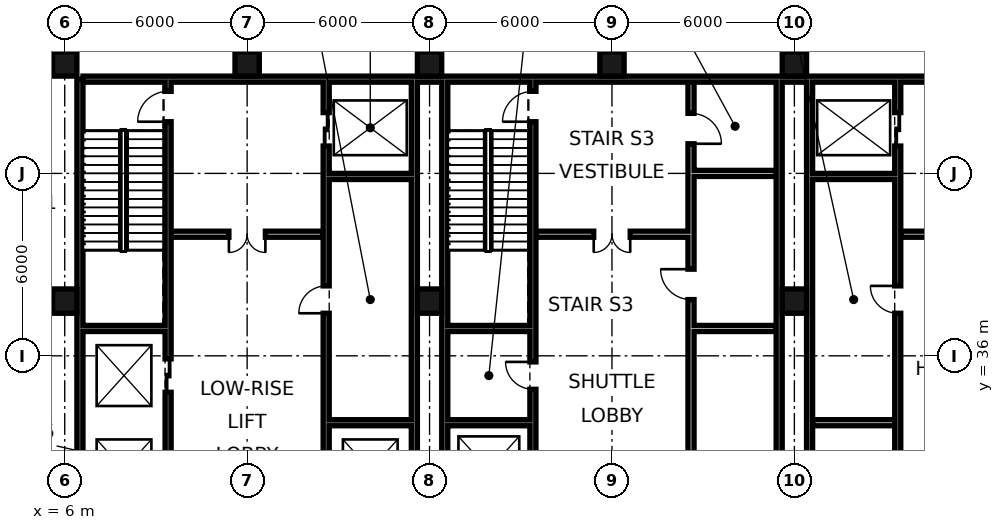
"""IFC4 building model, lengths in metres.
Left out: names, types, materials, properties, quantities, classifications, styles, units other than length and angle.
Written with IfcOpenShell. Run it as: python <this file> out.ifc"""

import sys

from ifc_helpers import new_model, si_unit, direction, frame, frame_2d, origin, origin_2d, place, context, subcontext, project, spatial, rectangle, hollow_rectangle, extrude, element, fill, save


model = new_model("IFC4")
c1 = context("Model", 3, precision=1e-05, world=origin(), true_north=direction((0.0, 1.0)))
c2 = subcontext(c1, "Body", "Model", "MODEL_VIEW")
j1 = project(units=[si_unit("LENGTHUNIT", "METRE"), si_unit("PLANEANGLEUNIT", "RADIAN")], contexts=[c1])
p1 = place(None, origin())
s1 = spatial("IfcSite", under=j1, at=p1, CompositionType="ELEMENT")
p2 = place(p1, origin())
s2 = spatial("IfcBuilding", under=s1, at=p2, CompositionType="ELEMENT")
p3 = place(p2, origin())
s3 = spatial("IfcBuildingStorey", under=s2, at=p3, CompositionType="ELEMENT", Elevation=0.0)
for number, where, z_axis, x_axis in (
    (1, (6.0, 37.8, 0.0), (0.0, 0.0, 1.0), (1.0, 0.0, 0.0)),
    (2, (6.0, 45.6, 0.0), (0.0, 0.0, 1.0), (1.0, 0.0, 0.0)),
    (3, (12.0, 45.6, 0.0), (0.0, 0.0, 1.0), (1.0, 0.0, 0.0)),
    (4, (18.0, 37.8, 0.0), (0.0, 0.0, 1.0), (1.0, 0.0, 0.0)),
    (5, (18.0, 45.6, 0.0), (0.0, 0.0, 1.0), (1.0, 0.0, 0.0)),
    (6, (24.0, 45.6, 0.0), (0.0, 0.0, 1.0), (1.0, 0.0, 0.0)),
    (7, (30.0, 37.8, 0.0), (0.0, 0.0, 1.0), (1.0, 0.0, 0.0)),
    (8, (30.0, 45.6, 0.0), (0.0, 0.0, 1.0), (1.0, 0.0, 0.0)),
):
    element("IfcColumn", number, at=place(p3, frame(where, z_axis=z_axis, x_axis=x_axis)), inside=s3, PredefinedType="COLUMN", context=c2, shape_type="SweptSolid", body=[
        extrude(hollow_rectangle(XDim=0.8, YDim=0.8, WallThickness=0.07, at=origin_2d()), origin(), (0.0, 0.0, 1.0), 15.0),
    ])
p4 = place(p3, frame((6.5, 21.6, 0.0), z_axis=(0.0, 0.0, 1.0), x_axis=(0.0, 1.0, 0.0)))
e9 = element("IfcWall", 9, at=p4, inside=s3, PredefinedType="SOLIDWALL", context=c2, shape_type="SweptSolid", body=[
    extrude(rectangle(XDim=23.5, YDim=0.2, at=frame_2d((11.75, 0.0))), origin(), (0.0, 0.0, 1.0), 14.55),
])
p5 = place(p3, frame((6.6, 45.1, 0.0), z_axis=(0.0, 0.0, 1.0), x_axis=(1.0, 0.0, 0.0)))
e10 = element("IfcWall", 10, at=p5, inside=s3, PredefinedType="SOLIDWALL", context=c2, shape_type="SweptSolid", body=[
    extrude(rectangle(XDim=34.8, YDim=0.2, at=frame_2d((17.4, 0.0))), origin(), (0.0, 0.0, 1.0), 14.55),
])
for number, where, z_axis, x_axis in (
    (11, (17.5, 27.6, 0.0), (0.0, 0.0, 1.0), (0.0, 1.0, 0.0)),
    (12, (18.5, 27.6, 0.0), (0.0, 0.0, 1.0), (0.0, 1.0, 0.0)),
    (13, (29.5, 27.6, 0.0), (0.0, 0.0, 1.0), (0.0, 1.0, 0.0)),
    (14, (30.5, 27.6, 0.0), (0.0, 0.0, 1.0), (0.0, 1.0, 0.0)),
):
    element("IfcWall", number, at=place(p3, frame(where, z_axis=z_axis, x_axis=x_axis)), inside=s3, PredefinedType="SOLIDWALL", context=c2, shape_type="SweptSolid", body=[
        extrude(rectangle(XDim=17.5, YDim=0.2, at=frame_2d((8.75, 0.0))), origin(), (0.0, 0.0, 1.0), 14.55),
    ])
p6 = place(p3, frame((14.6, 27.7, 0.0), z_axis=(0.0, 0.0, 1.0), x_axis=(0.0, 1.0, 0.0)))
e15 = element("IfcWall", 15, at=p6, inside=s3, PredefinedType="SOLIDWALL", context=c2, shape_type="SweptSolid", body=[
    extrude(rectangle(XDim=17.3, YDim=0.2, at=frame_2d((8.65, 0.0))), origin(), (0.0, 0.0, 1.0), 14.55),
])
p7 = place(p6, frame((0.9, 0.0, 0.0)))
e16 = element("IfcOpeningElement", 16, at=p7, cuts=e15, PredefinedType="OPENING", context=c2, shape_type="SweptSolid", body=[
    extrude(rectangle(XDim=1.1, YDim=2.1, at=frame_2d((0.55, 1.05))), frame((0.0, 0.11, 0.0), z_axis=(0.0, -1.0, 0.0), x_axis=(1.0, 0.0, 0.0)), (0.0, 0.0, 1.0), 0.22),
])
p8 = place(p6, frame((4.0, 0.0, 0.0)))
e17 = element("IfcOpeningElement", 17, at=p8, cuts=e15, PredefinedType="OPENING", context=c2, shape_type="SweptSolid", body=[
    extrude(rectangle(XDim=1.1, YDim=2.1, at=frame_2d((0.55, 1.05))), frame((0.0, 0.11, 0.0), z_axis=(0.0, -1.0, 0.0), x_axis=(1.0, 0.0, 0.0)), (0.0, 0.0, 1.0), 0.22),
])
p9 = place(p6, frame((15.2, 0.0, 0.0)))
e18 = element("IfcOpeningElement", 18, at=p9, cuts=e15, PredefinedType="OPENING", context=c2, shape_type="SweptSolid", body=[
    extrude(rectangle(XDim=1.1, YDim=2.1, at=frame_2d((0.55, 1.05))), frame((0.0, 0.11, 0.0), z_axis=(0.0, -1.0, 0.0), x_axis=(1.0, 0.0, 0.0)), (0.0, 0.0, 1.0), 0.22),
])
p10 = place(p6, frame((9.7, 0.0, 0.0)))
e19 = element("IfcOpeningElement", 19, at=p10, cuts=e15, PredefinedType="OPENING", context=c2, shape_type="SweptSolid", body=[
    extrude(rectangle(XDim=0.9, YDim=2.1, at=frame_2d((0.45, 1.05))), frame((0.0, 0.11, 0.0), z_axis=(0.0, -1.0, 0.0), x_axis=(1.0, 0.0, 0.0)), (0.0, 0.0, 1.0), 0.22),
])
p11 = place(p3, frame((21.4, 27.7, 0.0), z_axis=(0.0, 0.0, 1.0), x_axis=(0.0, 1.0, 0.0)))
e20 = element("IfcWall", 20, at=p11, inside=s3, PredefinedType="SOLIDWALL", context=c2, shape_type="SweptSolid", body=[
    extrude(rectangle(XDim=17.3, YDim=0.2, at=frame_2d((8.65, 0.0))), origin(), (0.0, 0.0, 1.0), 14.55),
])
p12 = place(p11, frame((0.9, 0.0, 0.0)))
e21 = element("IfcOpeningElement", 21, at=p12, cuts=e20, PredefinedType="OPENING", context=c2, shape_type="SweptSolid", body=[
    extrude(rectangle(XDim=1.1, YDim=2.1, at=frame_2d((0.55, 1.05))), frame((0.0, 0.11, 0.0), z_axis=(0.0, -1.0, 0.0), x_axis=(1.0, 0.0, 0.0)), (0.0, 0.0, 1.0), 0.22),
])
p13 = place(p11, frame((4.0, 0.0, 0.0)))
e22 = element("IfcOpeningElement", 22, at=p13, cuts=e20, PredefinedType="OPENING", context=c2, shape_type="SweptSolid", body=[
    extrude(rectangle(XDim=1.1, YDim=2.1, at=frame_2d((0.55, 1.05))), frame((0.0, 0.11, 0.0), z_axis=(0.0, -1.0, 0.0), x_axis=(1.0, 0.0, 0.0)), (0.0, 0.0, 1.0), 0.22),
])
p14 = place(p11, frame((16.0, 0.0, 0.0)))
e23 = element("IfcOpeningElement", 23, at=p14, cuts=e20, PredefinedType="OPENING", context=c2, shape_type="SweptSolid", body=[
    extrude(rectangle(XDim=1.0, YDim=2.1, at=frame_2d((0.5, 1.05))), frame((0.0, 0.11, 0.0), z_axis=(0.0, -1.0, 0.0), x_axis=(1.0, 0.0, 0.0)), (0.0, 0.0, 1.0), 0.22),
])
p15 = place(p11, frame((7.2, 0.0, 0.0)))
e24 = element("IfcOpeningElement", 24, at=p15, cuts=e20, PredefinedType="OPENING", context=c2, shape_type="SweptSolid", body=[
    extrude(rectangle(XDim=0.9, YDim=2.1, at=frame_2d((0.45, 1.05))), frame((0.0, 0.11, 0.0), z_axis=(0.0, -1.0, 0.0), x_axis=(1.0, 0.0, 0.0)), (0.0, 0.0, 1.0), 0.22),
])
p16 = place(p3, frame((26.6, 27.7, 0.0), z_axis=(0.0, 0.0, 1.0), x_axis=(0.0, 1.0, 0.0)))
e25 = element("IfcWall", 25, at=p16, inside=s3, PredefinedType="SOLIDWALL", context=c2, shape_type="SweptSolid", body=[
    extrude(rectangle(XDim=17.3, YDim=0.2, at=frame_2d((8.65, 0.0))), origin(), (0.0, 0.0, 1.0), 14.55),
])
p17 = place(p16, frame((4.1, 0.0, 0.0)))
e26 = element("IfcOpeningElement", 26, at=p17, cuts=e25, PredefinedType="OPENING", context=c2, shape_type="SweptSolid", body=[
    extrude(rectangle(XDim=0.9, YDim=2.1, at=frame_2d((0.45, 1.05))), frame((0.0, 0.11, 0.0), z_axis=(0.0, -1.0, 0.0), x_axis=(1.0, 0.0, 0.0)), (0.0, 0.0, 1.0), 0.22),
])
p18 = place(p16, frame((10.15, 0.0, 0.0)))
e27 = element("IfcOpeningElement", 27, at=p18, cuts=e25, PredefinedType="OPENING", context=c2, shape_type="SweptSolid", body=[
    extrude(rectangle(XDim=1.0, YDim=2.1, at=frame_2d((0.5, 1.05))), frame((0.0, 0.11, 0.0), z_axis=(0.0, -1.0, 0.0), x_axis=(1.0, 0.0, 0.0)), (0.0, 0.0, 1.0), 0.22),
])
p19 = place(p16, frame((15.275, 0.0, 0.0)))
e28 = element("IfcOpeningElement", 28, at=p19, cuts=e25, PredefinedType="OPENING", context=c2, shape_type="SweptSolid", body=[
    extrude(rectangle(XDim=1.0, YDim=2.1, at=frame_2d((0.5, 1.05))), frame((0.0, 0.11, 0.0), z_axis=(0.0, -1.0, 0.0), x_axis=(1.0, 0.0, 0.0)), (0.0, 0.0, 1.0), 0.22),
])
p20 = place(p3, frame((33.4, 27.7, 0.0), z_axis=(0.0, 0.0, 1.0), x_axis=(0.0, 1.0, 0.0)))
e29 = element("IfcWall", 29, at=p20, inside=s3, PredefinedType="SOLIDWALL", context=c2, shape_type="SweptSolid", body=[
    extrude(rectangle(XDim=17.3, YDim=0.2, at=frame_2d((8.65, 0.0))), origin(), (0.0, 0.0, 1.0), 13.85),
])
p21 = place(p20, frame((15.2, 0.0, 0.0)))
e30 = element("IfcOpeningElement", 30, at=p21, cuts=e29, PredefinedType="OPENING", context=c2, shape_type="SweptSolid", body=[
    extrude(rectangle(XDim=1.1, YDim=2.1, at=frame_2d((0.55, 1.05))), frame((0.0, 0.11, 0.0), z_axis=(0.0, -1.0, 0.0), x_axis=(1.0, 0.0, 0.0)), (0.0, 0.0, 1.0), 0.22),
])
p22 = place(p20, frame((2.5, 0.0, 0.0)))
e31 = element("IfcOpeningElement", 31, at=p22, cuts=e29, PredefinedType="OPENING", context=c2, shape_type="SweptSolid", body=[
    extrude(rectangle(XDim=1.0, YDim=2.1, at=frame_2d((0.5, 1.05))), frame((0.0, 0.11, 0.0), z_axis=(0.0, -1.0, 0.0), x_axis=(1.0, 0.0, 0.0)), (0.0, 0.0, 1.0), 0.22),
])
p23 = place(p20, frame((9.7, 0.0, 0.0)))
e32 = element("IfcOpeningElement", 32, at=p23, cuts=e29, PredefinedType="OPENING", context=c2, shape_type="SweptSolid", body=[
    extrude(rectangle(XDim=0.9, YDim=2.1, at=frame_2d((0.45, 1.05))), frame((0.0, 0.11, 0.0), z_axis=(0.0, -1.0, 0.0), x_axis=(1.0, 0.0, 0.0)), (0.0, 0.0, 1.0), 0.22),
])
p24 = place(p3, frame((9.4, 21.5, 0.0), z_axis=(0.0, 0.0, 1.0), x_axis=(0.0, 1.0, 0.0)))
e33 = element("IfcWall", 33, at=p24, inside=s3, PredefinedType="SOLIDWALL", context=c2, shape_type="SweptSolid", body=[
    extrude(rectangle(XDim=23.5, YDim=0.2, at=frame_2d((11.75, 0.0))), origin(), (0.0, 0.0, 1.0), 13.85),
])
p25 = place(p24, frame((7.1, 0.0, 0.0)))
e34 = element("IfcOpeningElement", 34, at=p25, cuts=e33, PredefinedType="OPENING", context=c2, shape_type="SweptSolid", body=[
    extrude(rectangle(XDim=1.1, YDim=2.1, at=frame_2d((0.55, 1.05))), frame((0.0, 0.11, 0.0), z_axis=(0.0, -1.0, 0.0), x_axis=(1.0, 0.0, 0.0)), (0.0, 0.0, 1.0), 0.22),
])
p26 = place(p24, frame((10.2, 0.0, 0.0)))
e35 = element("IfcOpeningElement", 35, at=p26, cuts=e33, PredefinedType="OPENING", context=c2, shape_type="SweptSolid", body=[
    extrude(rectangle(XDim=1.1, YDim=2.1, at=frame_2d((0.55, 1.05))), frame((0.0, 0.11, 0.0), z_axis=(0.0, -1.0, 0.0), x_axis=(1.0, 0.0, 0.0)), (0.0, 0.0, 1.0), 0.22),
])
p27 = place(p24, frame((13.3, 0.0, 0.0)))
e36 = element("IfcOpeningElement", 36, at=p27, cuts=e33, PredefinedType="OPENING", context=c2, shape_type="SweptSolid", body=[
    extrude(rectangle(XDim=1.1, YDim=2.1, at=frame_2d((0.55, 1.05))), frame((0.0, 0.11, 0.0), z_axis=(0.0, -1.0, 0.0), x_axis=(1.0, 0.0, 0.0)), (0.0, 0.0, 1.0), 0.22),
])
p28 = place(p24, frame((22.2, 0.0, 0.0)))
e37 = element("IfcOpeningElement", 37, at=p28, cuts=e33, PredefinedType="OPENING", context=c2, shape_type="SweptSolid", body=[
    extrude(rectangle(XDim=1.0, YDim=2.1, at=frame_2d((0.5, 1.05))), frame((0.0, 0.11, 0.0), z_axis=(0.0, -1.0, 0.0), x_axis=(1.0, 0.0, 0.0)), (0.0, 0.0, 1.0), 0.22),
])
p29 = place(p24, frame((0.275, 0.0, 0.0)))
e38 = element("IfcOpeningElement", 38, at=p29, cuts=e33, PredefinedType="OPENING", context=c2, shape_type="SweptSolid", body=[
    extrude(rectangle(XDim=0.9, YDim=2.1, at=frame_2d((0.45, 1.05))), frame((0.0, 0.11, 0.0), z_axis=(0.0, -1.0, 0.0), x_axis=(1.0, 0.0, 0.0)), (0.0, 0.0, 1.0), 0.22),
])
for number, where, z_axis, x_axis in (
    (39, (14.7, 33.8, 0.0), (0.0, 0.0, 1.0), (1.0, 0.0, 0.0)),
    (40, (18.6, 33.8, 0.0), (0.0, 0.0, 1.0), (1.0, 0.0, 0.0)),
    (41, (30.6, 33.8, 0.0), (0.0, 0.0, 1.0), (1.0, 0.0, 0.0)),
    (42, (18.6, 36.9, 0.0), (0.0, 0.0, 1.0), (1.0, 0.0, 0.0)),
    (43, (26.7, 36.9, 0.0), (0.0, 0.0, 1.0), (1.0, 0.0, 0.0)),
    (44, (6.6, 36.9, 0.0), (0.0, 0.0, 1.0), (1.0, 0.0, 0.0)),
):
    element("IfcWall", number, at=place(p3, frame(where, z_axis=z_axis, x_axis=x_axis)), inside=s3, PredefinedType="SOLIDWALL", context=c2, shape_type="SweptSolid", body=[
        extrude(rectangle(XDim=2.7, YDim=0.2, at=frame_2d((1.35, 0.0))), origin(), (0.0, 0.0, 1.0), 14.55),
    ])
p30 = place(p3, frame((21.5, 40.0, 0.0), z_axis=(0.0, 0.0, 1.0), x_axis=(1.0, 0.0, 0.0)))
e45 = element("IfcWall", 45, at=p30, inside=s3, PredefinedType="PARTITIONING", context=c2, shape_type="SweptSolid", body=[
    extrude(rectangle(XDim=5.0, YDim=0.2, at=frame_2d((2.5, 0.0))), origin(), (0.0, 0.0, 1.0), 14.55),
])
p31 = place(p30, frame((1.9, 0.0, 0.0)))
e46 = element("IfcOpeningElement", 46, at=p31, cuts=e45, PredefinedType="OPENING", context=c2, shape_type="SweptSolid", body=[
    extrude(rectangle(XDim=1.2, YDim=2.1, at=frame_2d((0.6, 1.05))), frame((0.0, 0.11, 0.0), z_axis=(0.0, -1.0, 0.0), x_axis=(1.0, 0.0, 0.0)), (0.0, 0.0, 1.0), 0.22),
])
p32 = place(p3, frame((33.5, 40.0, 0.0), z_axis=(0.0, 0.0, 1.0), x_axis=(1.0, 0.0, 0.0)))
e47 = element("IfcWall", 47, at=p32, inside=s3, PredefinedType="PARTITIONING", context=c2, shape_type="SweptSolid", body=[
    extrude(rectangle(XDim=5.0, YDim=0.2, at=frame_2d((2.5, 0.0))), origin(), (0.0, 0.0, 1.0), 14.55),
])
p33 = place(p32, frame((1.9, 0.0, 0.0)))
e48 = element("IfcOpeningElement", 48, at=p33, cuts=e47, PredefinedType="OPENING", context=c2, shape_type="SweptSolid", body=[
    extrude(rectangle(XDim=1.2, YDim=2.1, at=frame_2d((0.6, 1.05))), frame((0.0, 0.11, 0.0), z_axis=(0.0, -1.0, 0.0), x_axis=(1.0, 0.0, 0.0)), (0.0, 0.0, 1.0), 0.22),
])
p34 = place(p3, frame((9.5, 40.0, 0.0), z_axis=(0.0, 0.0, 1.0), x_axis=(1.0, 0.0, 0.0)))
e49 = element("IfcWall", 49, at=p34, inside=s3, PredefinedType="PARTITIONING", context=c2, shape_type="SweptSolid", body=[
    extrude(rectangle(XDim=5.0, YDim=0.2, at=frame_2d((2.5, 0.0))), origin(), (0.0, 0.0, 1.0), 14.55),
])
p35 = place(p34, frame((1.9, 0.0, 0.0)))
e50 = element("IfcOpeningElement", 50, at=p35, cuts=e49, PredefinedType="OPENING", context=c2, shape_type="SweptSolid", body=[
    extrude(rectangle(XDim=1.2, YDim=2.1, at=frame_2d((0.6, 1.05))), frame((0.0, 0.11, 0.0), z_axis=(0.0, -1.0, 0.0), x_axis=(1.0, 0.0, 0.0)), (0.0, 0.0, 1.0), 0.22),
])
for number, where, z_axis, x_axis in (
    (51, (14.7, 41.9, 0.0), (0.0, 0.0, 1.0), (1.0, 0.0, 0.0)),
    (52, (30.6, 41.9, 0.0), (0.0, 0.0, 1.0), (1.0, 0.0, 0.0)),
):
    element("IfcWall", number, at=place(p3, frame(where, z_axis=z_axis, x_axis=x_axis)), inside=s3, PredefinedType="SOLIDWALL", context=c2, shape_type="SweptSolid", body=[
        extrude(rectangle(XDim=2.7, YDim=0.2, at=frame_2d((1.35, 0.0))), origin(), (0.0, 0.0, 1.0), 14.55),
    ])
p36 = place(p3, frame((26.7, 42.0, 0.0), z_axis=(0.0, 0.0, 1.0), x_axis=(1.0, 0.0, 0.0)))
e53 = element("IfcWall", 53, at=p36, inside=s3, PredefinedType="PARTITIONING", context=c2, shape_type="SweptSolid", body=[
    extrude(rectangle(XDim=2.7, YDim=0.2, at=frame_2d((1.35, 0.0))), origin(), (0.0, 0.0, 1.0), 14.55),
])
p37 = place(p35, frame((1.2, 0.0, 0.0), z_axis=(0.0, 0.0, 1.0), x_axis=(-1.0, 0.0, 0.0)))
e54 = element("IfcDoor", 54, at=p37, inside=s3, OperationType="DOUBLE_DOOR_SINGLE_SWING", PredefinedType="DOOR", context=c2, shape_type="SweptSolid", body=[
    extrude(rectangle(XDim=1.2, YDim=2.1, at=frame_2d((0.6, 1.05))), frame((0.0, 0.025, 0.0), z_axis=(0.0, -1.0, 0.0), x_axis=(1.0, 0.0, 0.0)), (0.0, 0.0, 1.0), 0.05),
])
fill(e50, e54)
p38 = place(p31, frame((1.2, 0.0, 0.0), z_axis=(0.0, 0.0, 1.0), x_axis=(-1.0, 0.0, 0.0)))
e55 = element("IfcDoor", 55, at=p38, inside=s3, OperationType="DOUBLE_DOOR_SINGLE_SWING", PredefinedType="DOOR", context=c2, shape_type="SweptSolid", body=[
    extrude(rectangle(XDim=1.2, YDim=2.1, at=frame_2d((0.6, 1.05))), frame((0.0, 0.025, 0.0), z_axis=(0.0, -1.0, 0.0), x_axis=(1.0, 0.0, 0.0)), (0.0, 0.0, 1.0), 0.05),
])
fill(e46, e55)
p39 = place(p21, origin())
e56 = element("IfcDoor", 56, at=p39, inside=s3, OperationType="DOUBLE_DOOR_SLIDING", PredefinedType="DOOR", context=c2, shape_type="SweptSolid", body=[
    extrude(rectangle(XDim=1.1, YDim=2.1, at=frame_2d((0.55, 1.05))), frame((0.0, 0.025, 0.0), z_axis=(0.0, -1.0, 0.0), x_axis=(1.0, 0.0, 0.0)), (0.0, 0.0, 1.0), 0.05),
])
fill(e30, e56)
p40 = place(p9, origin())
e57 = element("IfcDoor", 57, at=p40, inside=s3, OperationType="DOUBLE_DOOR_SLIDING", PredefinedType="DOOR", context=c2, shape_type="SweptSolid", body=[
    extrude(rectangle(XDim=1.1, YDim=2.1, at=frame_2d((0.55, 1.05))), frame((0.0, 0.025, 0.0), z_axis=(0.0, -1.0, 0.0), x_axis=(1.0, 0.0, 0.0)), (0.0, 0.0, 1.0), 0.05),
])
fill(e18, e57)
p41 = place(p27, origin())
e58 = element("IfcDoor", 58, at=p41, inside=s3, OperationType="DOUBLE_DOOR_SLIDING", PredefinedType="DOOR", context=c2, shape_type="SweptSolid", body=[
    extrude(rectangle(XDim=1.1, YDim=2.1, at=frame_2d((0.55, 1.05))), frame((0.0, 0.025, 0.0), z_axis=(0.0, -1.0, 0.0), x_axis=(1.0, 0.0, 0.0)), (0.0, 0.0, 1.0), 0.05),
])
fill(e36, e58)
p42 = place(p28, origin())
e59 = element("IfcDoor", 59, at=p42, inside=s3, OperationType="SINGLE_SWING_LEFT", PredefinedType="DOOR", context=c2, shape_type="SweptSolid", body=[
    extrude(rectangle(XDim=1.0, YDim=2.1, at=frame_2d((0.5, 1.05))), frame((0.0, 0.025, 0.0), z_axis=(0.0, -1.0, 0.0), x_axis=(1.0, 0.0, 0.0)), (0.0, 0.0, 1.0), 0.05),
])
fill(e37, e59)
p43 = place(p14, origin())
e60 = element("IfcDoor", 60, at=p43, inside=s3, OperationType="SINGLE_SWING_LEFT", PredefinedType="DOOR", context=c2, shape_type="SweptSolid", body=[
    extrude(rectangle(XDim=1.0, YDim=2.1, at=frame_2d((0.5, 1.05))), frame((0.0, 0.025, 0.0), z_axis=(0.0, -1.0, 0.0), x_axis=(1.0, 0.0, 0.0)), (0.0, 0.0, 1.0), 0.05),
])
fill(e23, e60)
p44 = place(p10, origin())
e61 = element("IfcDoor", 61, at=p44, inside=s3, OperationType="SINGLE_SWING_LEFT", PredefinedType="DOOR", context=c2, shape_type="SweptSolid", body=[
    extrude(rectangle(XDim=0.9, YDim=2.1, at=frame_2d((0.45, 1.05))), frame((0.0, 0.025, 0.0), z_axis=(0.0, -1.0, 0.0), x_axis=(1.0, 0.0, 0.0)), (0.0, 0.0, 1.0), 0.05),
])
fill(e19, e61)
p45 = place(p23, frame((0.9, 0.0, 0.0), z_axis=(0.0, 0.0, 1.0), x_axis=(-1.0, 0.0, 0.0)))
e62 = element("IfcDoor", 62, at=p45, inside=s3, OperationType="SINGLE_SWING_LEFT", PredefinedType="DOOR", context=c2, shape_type="SweptSolid", body=[
    extrude(rectangle(XDim=0.9, YDim=2.1, at=frame_2d((0.45, 1.05))), frame((0.0, 0.025, 0.0), z_axis=(0.0, -1.0, 0.0), x_axis=(1.0, 0.0, 0.0)), (0.0, 0.0, 1.0), 0.05),
])
fill(e32, e62)
p46 = place(p15, frame((0.9, 0.0, 0.0), z_axis=(0.0, 0.0, 1.0), x_axis=(-1.0, 0.0, 0.0)))
e63 = element("IfcDoor", 63, at=p46, inside=s3, OperationType="SINGLE_SWING_LEFT", PredefinedType="DOOR", context=c2, shape_type="SweptSolid", body=[
    extrude(rectangle(XDim=0.9, YDim=2.1, at=frame_2d((0.45, 1.05))), frame((0.0, 0.025, 0.0), z_axis=(0.0, -1.0, 0.0), x_axis=(1.0, 0.0, 0.0)), (0.0, 0.0, 1.0), 0.05),
])
fill(e24, e63)
p47 = place(p18, frame((1.0, 0.0, 0.0), z_axis=(0.0, 0.0, 1.0), x_axis=(-1.0, 0.0, 0.0)))
e64 = element("IfcDoor", 64, at=p47, inside=s3, OperationType="SINGLE_SWING_LEFT", PredefinedType="DOOR", context=c2, shape_type="SweptSolid", body=[
    extrude(rectangle(XDim=1.0, YDim=2.1, at=frame_2d((0.5, 1.05))), frame((0.0, 0.025, 0.0), z_axis=(0.0, -1.0, 0.0), x_axis=(1.0, 0.0, 0.0)), (0.0, 0.0, 1.0), 0.05),
])
fill(e27, e64)
p48 = place(p19, frame((1.0, 0.0, 0.0), z_axis=(0.0, 0.0, 1.0), x_axis=(-1.0, 0.0, 0.0)))
e65 = element("IfcDoor", 65, at=p48, inside=s3, OperationType="SINGLE_SWING_RIGHT", PredefinedType="DOOR", context=c2, shape_type="SweptSolid", body=[
    extrude(rectangle(XDim=1.0, YDim=2.1, at=frame_2d((0.5, 1.05))), frame((0.0, 0.025, 0.0), z_axis=(0.0, -1.0, 0.0), x_axis=(1.0, 0.0, 0.0)), (0.0, 0.0, 1.0), 0.05),
])
fill(e28, e65)
save(model, sys.argv[1])
